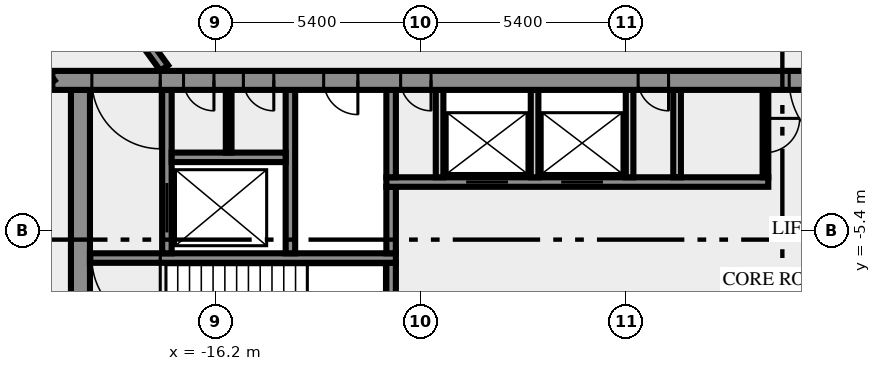
"""IFC4 building model, lengths in metres.
Left out: names, types, materials, properties, quantities, classifications, styles, units other than length and angle.
Written with IfcOpenShell. Run it as: python <this file> out.ifc"""

import sys

from ifc_helpers import new_model, si_unit, direction, frame, frame_2d, origin, place, context, subcontext, project, spatial, rectangle, extrude, element, fill, save


model = new_model("IFC4")
c1 = context("Model", 3, precision=1e-05, world=origin(), true_north=direction((0.0, 1.0)))
c2 = subcontext(c1, "Body", "Model", "MODEL_VIEW")
j1 = project(units=[si_unit("LENGTHUNIT", "METRE"), si_unit("PLANEANGLEUNIT", "RADIAN")], contexts=[c1])
p1 = place(None, origin())
s1 = spatial("IfcSite", under=j1, at=p1, CompositionType="ELEMENT")
p2 = place(p1, origin())
s2 = spatial("IfcBuilding", under=s1, at=p2, CompositionType="ELEMENT")
p3 = place(p2, frame((0.0, 0.0, 335.0)))
s3 = spatial("IfcBuildingStorey", under=s2, at=p3, CompositionType="ELEMENT", Elevation=335.0)
p4 = place(p3, frame((-19.75, -10.5, 0.0), z_axis=(0.0, 0.0, 1.0), x_axis=(0.0, 1.0, 0.0)))
e1 = element("IfcWall", 1, at=p4, inside=s3, PredefinedType="SHEAR", context=c2, shape_type="SweptSolid", body=[
    extrude(rectangle(XDim=8.8, YDim=0.5, at=frame_2d((4.4, 0.0))), origin(), (0.0, 0.0, 1.0), 3.65),
])
p5 = place(p3, frame((-11.575, -7.25, 0.0), z_axis=(0.0, 0.0, 1.0), x_axis=(0.0, 1.0, 0.0)))
e2 = element("IfcWall", 2, at=p5, inside=s3, PredefinedType="SHEAR", context=c2, shape_type="SweptSolid", body=[
    extrude(rectangle(XDim=1.0, YDim=0.25, at=frame_2d((0.5, 0.0))), origin(), (0.0, 0.0, 1.0), 3.65),
])
p6 = place(p3, frame((-11.45, -6.125, 0.0), z_axis=(0.0, 0.0, 1.0), x_axis=(-1.0, 0.0, 0.0)))
e3 = element("IfcWall", 3, at=p6, inside=s3, PredefinedType="SHEAR", context=c2, shape_type="SweptSolid", body=[
    extrude(rectangle(XDim=8.05, YDim=0.25, at=frame_2d((4.025, 0.0))), origin(), (0.0, 0.0, 1.0), 3.65),
])
p7 = place(p6, frame((6.2, 0.0, 0.0)))
e4 = element("IfcOpeningElement", 4, at=p7, cuts=e3, PredefinedType="OPENING", context=c2, shape_type="SweptSolid", body=[
    extrude(rectangle(XDim=1.8, YDim=2.1, at=frame_2d((0.9, 1.05))), frame((0.0, 0.135, 0.0), z_axis=(0.0, -1.0, 0.0), x_axis=(1.0, 0.0, 0.0)), (0.0, 0.0, 1.0), 0.27),
])
p8 = place(p3, frame((-17.475, -6.0, 0.0), z_axis=(0.0, 0.0, 1.0), x_axis=(0.0, 1.0, 0.0)))
e5 = element("IfcWall", 5, at=p8, inside=s3, PredefinedType="SHEAR", context=c2, shape_type="SweptSolid", body=[
    extrude(rectangle(XDim=4.3, YDim=0.25, at=frame_2d((2.15, 0.0))), origin(), (0.0, 0.0, 1.0), 3.65),
])
p9 = place(p8, frame((0.55, 0.0, 0.0)))
e6 = element("IfcOpeningElement", 6, at=p9, cuts=e5, PredefinedType="OPENING", context=c2, shape_type="SweptSolid", body=[
    extrude(rectangle(XDim=1.3, YDim=2.1, at=frame_2d((0.65, 1.05))), frame((0.0, 0.135, 0.0), z_axis=(0.0, -1.0, 0.0), x_axis=(1.0, 0.0, 0.0)), (0.0, 0.0, 1.0), 0.27),
])
p10 = place(p3, frame((-14.225, -6.0, 0.0), z_axis=(0.0, 0.0, 1.0), x_axis=(0.0, 1.0, 0.0)))
e7 = element("IfcWall", 7, at=p10, inside=s3, PredefinedType="SHEAR", context=c2, shape_type="SweptSolid", body=[
    extrude(rectangle(XDim=4.3, YDim=0.25, at=frame_2d((2.15, 0.0))), origin(), (0.0, 0.0, 1.0), 3.65),
])
p11 = place(p3, frame((-11.575, -6.0, 0.0), z_axis=(0.0, 0.0, 1.0), x_axis=(0.0, 1.0, 0.0)))
e8 = element("IfcWall", 8, at=p11, inside=s3, PredefinedType="SHEAR", context=c2, shape_type="SweptSolid", body=[
    extrude(rectangle(XDim=1.75, YDim=0.25, at=frame_2d((0.875, 0.0))), origin(), (0.0, 0.0, 1.0), 3.65),
])
p12 = place(p3, frame((-11.7, -4.125, 0.0), z_axis=(0.0, 0.0, 1.0), x_axis=(1.0, 0.0, 0.0)))
e9 = element("IfcWall", 9, at=p12, inside=s3, PredefinedType="SHEAR", context=c2, shape_type="SweptSolid", body=[
    extrude(rectangle(XDim=10.05, YDim=0.25, at=frame_2d((5.025, 0.0))), origin(), (0.0, 0.0, 1.0), 3.65),
])
p13 = place(p12, frame((2.1, 0.0, 0.0)))
e10 = element("IfcOpeningElement", 10, at=p13, cuts=e9, PredefinedType="OPENING", context=c2, shape_type="SweptSolid", body=[
    extrude(rectangle(XDim=1.1, YDim=2.1, at=frame_2d((0.55, 1.05))), frame((0.0, 0.135, 0.0), z_axis=(0.0, -1.0, 0.0), x_axis=(1.0, 0.0, 0.0)), (0.0, 0.0, 1.0), 0.27),
])
p14 = place(p12, frame((4.6, 0.0, 0.0)))
e11 = element("IfcOpeningElement", 11, at=p14, cuts=e9, PredefinedType="OPENING", context=c2, shape_type="SweptSolid", body=[
    extrude(rectangle(XDim=1.1, YDim=2.1, at=frame_2d((0.55, 1.05))), frame((0.0, 0.135, 0.0), z_axis=(0.0, -1.0, 0.0), x_axis=(1.0, 0.0, 0.0)), (0.0, 0.0, 1.0), 0.27),
])
p15 = place(p3, frame((-11.575, -4.0, 0.0), z_axis=(0.0, 0.0, 1.0), x_axis=(0.0, 1.0, 0.0)))
e12 = element("IfcWall", 12, at=p15, inside=s3, PredefinedType="SHEAR", context=c2, shape_type="SweptSolid", body=[
    extrude(rectangle(XDim=2.3, YDim=0.25, at=frame_2d((1.15, 0.0))), origin(), (0.0, 0.0, 1.0), 3.65),
])
for number, where, z_axis, x_axis in (
    (13, (-10.3, -4.0, 0.0), (0.0, 0.0, 1.0), (0.0, 1.0, 0.0)),
    (14, (-7.8, -4.0, 0.0), (0.0, 0.0, 1.0), (0.0, 1.0, 0.0)),
    (15, (-5.3, -4.0, 0.0), (0.0, 0.0, 1.0), (0.0, 1.0, 0.0)),
    (16, (-4.05, -4.0, 0.0), (0.0, 0.0, 1.0), (0.0, 1.0, 0.0)),
):
    element("IfcWall", number, at=place(p3, frame(where, z_axis=z_axis, x_axis=x_axis)), inside=s3, PredefinedType="SOLIDWALL", context=c2, shape_type="SweptSolid", body=[
        extrude(rectangle(XDim=2.3, YDim=0.2, at=frame_2d((1.15, 0.0))), origin(), (0.0, 0.0, 1.0), 3.65),
    ])
p16 = place(p3, frame((-1.725, -1.7, 0.0), z_axis=(0.0, 0.0, 1.0), x_axis=(0.0, -1.0, 0.0)))
e17 = element("IfcWall", 17, at=p16, inside=s3, PredefinedType="PARTITIONING", context=c2, shape_type="SweptSolid", body=[
    extrude(rectangle(XDim=2.3, YDim=0.15, at=frame_2d((1.15, 0.0))), origin(), (0.0, 0.0, 1.0), 3.65),
])
p17 = place(p16, frame((0.75, 0.0, 0.0)))
e18 = element("IfcOpeningElement", 18, at=p17, cuts=e17, PredefinedType="OPENING", context=c2, shape_type="SweptSolid", body=[
    extrude(rectangle(XDim=0.9, YDim=2.1, at=frame_2d((0.45, 1.05))), frame((0.0, 0.085, 0.0), z_axis=(0.0, -1.0, 0.0), x_axis=(1.0, 0.0, 0.0)), (0.0, 0.0, 1.0), 0.17),
])
p18 = place(p3, frame((-17.35, -3.475, 0.0), z_axis=(0.0, 0.0, 1.0), x_axis=(1.0, 0.0, 0.0)))
e19 = element("IfcWall", 19, at=p18, inside=s3, PredefinedType="SHEAR", context=c2, shape_type="SweptSolid", body=[
    extrude(rectangle(XDim=3.0, YDim=0.25, at=frame_2d((1.5, 0.0))), origin(), (0.0, 0.0, 1.0), 3.65),
])
p19 = place(p3, frame((-15.85, -3.35, 0.0), z_axis=(0.0, 0.0, 1.0), x_axis=(0.0, 1.0, 0.0)))
e20 = element("IfcWall", 20, at=p19, inside=s3, PredefinedType="PARTITIONING", context=c2, shape_type="SweptSolid", body=[
    extrude(rectangle(XDim=1.65, YDim=0.15, at=frame_2d((0.825, 0.0))), origin(), (0.0, 0.0, 1.0), 3.65),
])
p20 = place(p3, frame((20.49, -1.45, 0.0), z_axis=(0.0, 0.0, 1.0), x_axis=(-1.0, 0.0, 0.0)))
e21 = element("IfcWall", 21, at=p20, inside=s3, PredefinedType="SHEAR", context=c2, shape_type="SweptSolid", body=[
    extrude(rectangle(XDim=40.98, YDim=0.5, at=frame_2d((20.49, 0.0))), origin(), (0.0, 0.0, 1.0), 3.65),
])
p21 = place(p20, frame((38.14, 0.0, 0.0)))
e22 = element("IfcOpeningElement", 22, at=p21, cuts=e21, PredefinedType="OPENING", context=c2, shape_type="SweptSolid", body=[
    extrude(rectangle(XDim=1.8, YDim=2.1, at=frame_2d((0.9, 1.05))), frame((0.0, 0.26, 0.0), z_axis=(0.0, -1.0, 0.0), x_axis=(1.0, 0.0, 0.0)), (0.0, 0.0, 1.0), 0.52),
])
p22 = place(p20, frame((36.728, 0.0, 0.0)))
e23 = element("IfcOpeningElement", 23, at=p22, cuts=e21, PredefinedType="OPENING", context=c2, shape_type="SweptSolid", body=[
    extrude(rectangle(XDim=0.8, YDim=2.1, at=frame_2d((0.4, 1.05))), frame((0.0, 0.26, 0.0), z_axis=(0.0, -1.0, 0.0), x_axis=(1.0, 0.0, 0.0)), (0.0, 0.0, 1.0), 0.52),
])
p23 = place(p20, frame((35.153, 0.0, 0.0)))
e24 = element("IfcOpeningElement", 24, at=p23, cuts=e21, PredefinedType="OPENING", context=c2, shape_type="SweptSolid", body=[
    extrude(rectangle(XDim=0.8, YDim=2.1, at=frame_2d((0.4, 1.05))), frame((0.0, 0.26, 0.0), z_axis=(0.0, -1.0, 0.0), x_axis=(1.0, 0.0, 0.0)), (0.0, 0.0, 1.0), 0.52),
])
p24 = place(p20, frame((32.94, 0.0, 0.0)))
e25 = element("IfcOpeningElement", 25, at=p24, cuts=e21, PredefinedType="OPENING", context=c2, shape_type="SweptSolid", body=[
    extrude(rectangle(XDim=0.9, YDim=2.1, at=frame_2d((0.45, 1.05))), frame((0.0, 0.26, 0.0), z_axis=(0.0, -1.0, 0.0), x_axis=(1.0, 0.0, 0.0)), (0.0, 0.0, 1.0), 0.52),
])
p25 = place(p20, frame((31.015, 0.0, 0.0)))
e26 = element("IfcOpeningElement", 26, at=p25, cuts=e21, PredefinedType="OPENING", context=c2, shape_type="SweptSolid", body=[
    extrude(rectangle(XDim=0.8, YDim=2.1, at=frame_2d((0.4, 1.05))), frame((0.0, 0.26, 0.0), z_axis=(0.0, -1.0, 0.0), x_axis=(1.0, 0.0, 0.0)), (0.0, 0.0, 1.0), 0.52),
])
p26 = place(p20, frame((24.765, 0.0, 0.0)))
e27 = element("IfcOpeningElement", 27, at=p26, cuts=e21, PredefinedType="OPENING", context=c2, shape_type="SweptSolid", body=[
    extrude(rectangle(XDim=0.8, YDim=2.1, at=frame_2d((0.4, 1.05))), frame((0.0, 0.26, 0.0), z_axis=(0.0, -1.0, 0.0), x_axis=(1.0, 0.0, 0.0)), (0.0, 0.0, 1.0), 0.52),
])
p27 = place(p20, frame((19.59, 0.0, 0.0)))
e28 = element("IfcOpeningElement", 28, at=p27, cuts=e21, PredefinedType="OPENING", context=c2, shape_type="SweptSolid", body=[
    extrude(rectangle(XDim=2.0, YDim=2.1, at=frame_2d((1.0, 1.05))), frame((0.0, 0.26, 0.0), z_axis=(0.0, -1.0, 0.0), x_axis=(1.0, 0.0, 0.0)), (0.0, 0.0, 1.0), 0.52),
])
p28 = place(p20, frame((15.103, 0.0, 0.0)))
e29 = element("IfcOpeningElement", 29, at=p28, cuts=e21, PredefinedType="OPENING", context=c2, shape_type="SweptSolid", body=[
    extrude(rectangle(XDim=0.9, YDim=2.1, at=frame_2d((0.45, 1.05))), frame((0.0, 0.26, 0.0), z_axis=(0.0, -1.0, 0.0), x_axis=(1.0, 0.0, 0.0)), (0.0, 0.0, 1.0), 0.52),
])
p29 = place(p20, frame((13.04, 0.0, 0.0)))
e30 = element("IfcOpeningElement", 30, at=p29, cuts=e21, PredefinedType="OPENING", context=c2, shape_type="SweptSolid", body=[
    extrude(rectangle(XDim=0.9, YDim=2.1, at=frame_2d((0.45, 1.05))), frame((0.0, 0.26, 0.0), z_axis=(0.0, -1.0, 0.0), x_axis=(1.0, 0.0, 0.0)), (0.0, 0.0, 1.0), 0.52),
])
p30 = place(p20, frame((10.177, 0.0, 0.0)))
e31 = element("IfcOpeningElement", 31, at=p30, cuts=e21, PredefinedType="OPENING", context=c2, shape_type="SweptSolid", body=[
    extrude(rectangle(XDim=0.9, YDim=2.1, at=frame_2d((0.45, 1.05))), frame((0.0, 0.26, 0.0), z_axis=(0.0, -1.0, 0.0), x_axis=(1.0, 0.0, 0.0)), (0.0, 0.0, 1.0), 0.52),
])
p31 = place(p20, frame((7.14, 0.0, 0.0)))
e32 = element("IfcOpeningElement", 32, at=p31, cuts=e21, PredefinedType="OPENING", context=c2, shape_type="SweptSolid", body=[
    extrude(rectangle(XDim=0.9, YDim=2.1, at=frame_2d((0.45, 1.05))), frame((0.0, 0.26, 0.0), z_axis=(0.0, -1.0, 0.0), x_axis=(1.0, 0.0, 0.0)), (0.0, 0.0, 1.0), 0.52),
])
p32 = place(p20, frame((4.19, 0.0, 0.0)))
e33 = element("IfcOpeningElement", 33, at=p32, cuts=e21, PredefinedType="OPENING", context=c2, shape_type="SweptSolid", body=[
    extrude(rectangle(XDim=0.9, YDim=2.1, at=frame_2d((0.45, 1.05))), frame((0.0, 0.26, 0.0), z_axis=(0.0, -1.0, 0.0), x_axis=(1.0, 0.0, 0.0)), (0.0, 0.0, 1.0), 0.52),
])
p33 = place(p20, frame((1.04, 0.0, 0.0)))
e34 = element("IfcOpeningElement", 34, at=p33, cuts=e21, PredefinedType="OPENING", context=c2, shape_type="SweptSolid", body=[
    extrude(rectangle(XDim=1.8, YDim=2.1, at=frame_2d((0.9, 1.05))), frame((0.0, 0.26, 0.0), z_axis=(0.0, -1.0, 0.0), x_axis=(1.0, 0.0, 0.0)), (0.0, 0.0, 1.0), 0.52),
])
p34 = place(p3, frame((-20.531, -1.523, 0.0), z_axis=(0.0, 0.0, 1.0), x_axis=(-0.587785867777, 0.809016547199, 0.0)))
e35 = element("IfcWall", 35, at=p34, inside=s3, PredefinedType="SOLIDWALL", context=c2, shape_type="SweptSolid", body=[
    extrude(rectangle(XDim=16.67, YDim=0.25, at=frame_2d((8.335, 0.0))), origin(), (0.0, 0.0, 1.0), 3.65),
])
p35 = place(p34, frame((0.533, 0.0, 0.0)))
e36 = element("IfcOpeningElement", 36, at=p35, cuts=e35, PredefinedType="OPENING", context=c2, shape_type="SweptSolid", body=[
    extrude(rectangle(XDim=0.9, YDim=2.1, at=frame_2d((0.45, 1.05))), frame((0.0, 0.135, 0.0), z_axis=(0.0, -1.0, 0.0), x_axis=(1.0, 0.0, 0.0)), (0.0, 0.0, 1.0), 0.27),
])
p36 = place(p34, frame((15.296, 0.0, 0.0)))
e37 = element("IfcOpeningElement", 37, at=p36, cuts=e35, PredefinedType="OPENING", context=c2, shape_type="SweptSolid", body=[
    extrude(rectangle(XDim=0.9, YDim=2.1, at=frame_2d((0.45, 1.05))), frame((0.0, 0.135, 0.0), z_axis=(0.0, -1.0, 0.0), x_axis=(1.0, 0.0, 0.0)), (0.0, 0.0, 1.0), 0.27),
])
p37 = place(p3, frame((-28.039, 13.319, 0.0), z_axis=(0.0, 0.0, 1.0), x_axis=(0.587791911753, -0.809012155952, 0.0)))
e38 = element("IfcWall", 38, at=p37, inside=s3, PredefinedType="SOLIDWALL", context=c2, shape_type="SweptSolid", body=[
    extrude(rectangle(XDim=17.853, YDim=0.25, at=frame_2d((8.927, 0.0))), origin(), (0.0, 0.0, 1.0), 3.65),
])
p38 = place(p37, frame((0.225, 0.0, 0.0)))
e39 = element("IfcOpeningElement", 39, at=p38, cuts=e38, PredefinedType="OPENING", context=c2, shape_type="SweptSolid", body=[
    extrude(rectangle(XDim=0.9, YDim=2.1, at=frame_2d((0.45, 1.05))), frame((0.0, 0.135, 0.0), z_axis=(0.0, -1.0, 0.0), x_axis=(1.0, 0.0, 0.0)), (0.0, 0.0, 1.0), 0.27),
])
p39 = place(p7, origin())
e40 = element("IfcDoor", 40, at=p39, inside=s3, OperationType="DOUBLE_DOOR_SINGLE_SWING", PredefinedType="DOOR", context=c2, shape_type="SweptSolid", body=[
    extrude(rectangle(XDim=1.8, YDim=2.1, at=frame_2d((0.9, 1.05))), frame((0.0, 0.025, 0.0), z_axis=(0.0, -1.0, 0.0), x_axis=(1.0, 0.0, 0.0)), (0.0, 0.0, 1.0), 0.05),
])
fill(e4, e40)
p40 = place(p9, origin())
e41 = element("IfcDoor", 41, at=p40, inside=s3, OperationType="DOUBLE_DOOR_SLIDING", PredefinedType="DOOR", context=c2, shape_type="SweptSolid", body=[
    extrude(rectangle(XDim=1.3, YDim=2.1, at=frame_2d((0.65, 1.05))), frame((0.0, 0.025, 0.0), z_axis=(0.0, -1.0, 0.0), x_axis=(1.0, 0.0, 0.0)), (0.0, 0.0, 1.0), 0.05),
])
fill(e6, e41)
p41 = place(p13, origin())
e42 = element("IfcDoor", 42, at=p41, inside=s3, OperationType="DOUBLE_DOOR_SLIDING", PredefinedType="DOOR", context=c2, shape_type="SweptSolid", body=[
    extrude(rectangle(XDim=1.1, YDim=2.1, at=frame_2d((0.55, 1.05))), frame((0.0, 0.025, 0.0), z_axis=(0.0, -1.0, 0.0), x_axis=(1.0, 0.0, 0.0)), (0.0, 0.0, 1.0), 0.05),
])
fill(e10, e42)
p42 = place(p14, origin())
e43 = element("IfcDoor", 43, at=p42, inside=s3, OperationType="DOUBLE_DOOR_SLIDING", PredefinedType="DOOR", context=c2, shape_type="SweptSolid", body=[
    extrude(rectangle(XDim=1.1, YDim=2.1, at=frame_2d((0.55, 1.05))), frame((0.0, 0.025, 0.0), z_axis=(0.0, -1.0, 0.0), x_axis=(1.0, 0.0, 0.0)), (0.0, 0.0, 1.0), 0.05),
])
fill(e11, e43)
p43 = place(p17, origin())
e44 = element("IfcDoor", 44, at=p43, inside=s3, OperationType="SINGLE_SWING_RIGHT", PredefinedType="DOOR", context=c2, shape_type="SweptSolid", body=[
    extrude(rectangle(XDim=0.9, YDim=2.1, at=frame_2d((0.45, 1.05))), frame((0.0, 0.025, 0.0), z_axis=(0.0, -1.0, 0.0), x_axis=(1.0, 0.0, 0.0)), (0.0, 0.0, 1.0), 0.05),
])
fill(e18, e44)
p44 = place(p21, origin())
e45 = element("IfcDoor", 45, at=p44, inside=s3, OperationType="DOUBLE_DOOR_SINGLE_SWING", PredefinedType="DOOR", context=c2, shape_type="SweptSolid", body=[
    extrude(rectangle(XDim=1.8, YDim=2.1, at=frame_2d((0.9, 1.05))), frame((0.0, 0.025, 0.0), z_axis=(0.0, -1.0, 0.0), x_axis=(1.0, 0.0, 0.0)), (0.0, 0.0, 1.0), 0.05),
])
fill(e22, e45)
p45 = place(p22, origin())
e46 = element("IfcDoor", 46, at=p45, inside=s3, OperationType="SINGLE_SWING_RIGHT", PredefinedType="DOOR", context=c2, shape_type="SweptSolid", body=[
    extrude(rectangle(XDim=0.8, YDim=2.1, at=frame_2d((0.4, 1.05))), frame((0.0, 0.025, 0.0), z_axis=(0.0, -1.0, 0.0), x_axis=(1.0, 0.0, 0.0)), (0.0, 0.0, 1.0), 0.05),
])
fill(e23, e46)
p46 = place(p23, origin())
e47 = element("IfcDoor", 47, at=p46, inside=s3, OperationType="SINGLE_SWING_RIGHT", PredefinedType="DOOR", context=c2, shape_type="SweptSolid", body=[
    extrude(rectangle(XDim=0.8, YDim=2.1, at=frame_2d((0.4, 1.05))), frame((0.0, 0.025, 0.0), z_axis=(0.0, -1.0, 0.0), x_axis=(1.0, 0.0, 0.0)), (0.0, 0.0, 1.0), 0.05),
])
fill(e24, e47)
p47 = place(p24, origin())
e48 = element("IfcDoor", 48, at=p47, inside=s3, OperationType="SINGLE_SWING_RIGHT", PredefinedType="DOOR", context=c2, shape_type="SweptSolid", body=[
    extrude(rectangle(XDim=0.9, YDim=2.1, at=frame_2d((0.45, 1.05))), frame((0.0, 0.025, 0.0), z_axis=(0.0, -1.0, 0.0), x_axis=(1.0, 0.0, 0.0)), (0.0, 0.0, 1.0), 0.05),
])
fill(e25, e48)
p48 = place(p25, origin())
e49 = element("IfcDoor", 49, at=p48, inside=s3, OperationType="SINGLE_SWING_RIGHT", PredefinedType="DOOR", context=c2, shape_type="SweptSolid", body=[
    extrude(rectangle(XDim=0.8, YDim=2.1, at=frame_2d((0.4, 1.05))), frame((0.0, 0.025, 0.0), z_axis=(0.0, -1.0, 0.0), x_axis=(1.0, 0.0, 0.0)), (0.0, 0.0, 1.0), 0.05),
])
fill(e26, e49)
p49 = place(p26, origin())
e50 = element("IfcDoor", 50, at=p49, inside=s3, OperationType="SINGLE_SWING_RIGHT", PredefinedType="DOOR", context=c2, shape_type="SweptSolid", body=[
    extrude(rectangle(XDim=0.8, YDim=2.1, at=frame_2d((0.4, 1.05))), frame((0.0, 0.025, 0.0), z_axis=(0.0, -1.0, 0.0), x_axis=(1.0, 0.0, 0.0)), (0.0, 0.0, 1.0), 0.05),
])
fill(e27, e50)
p50 = place(p27, origin())
e51 = element("IfcDoor", 51, at=p50, inside=s3, OperationType="DOUBLE_DOOR_SINGLE_SWING", PredefinedType="DOOR", context=c2, shape_type="SweptSolid", body=[
    extrude(rectangle(XDim=2.0, YDim=2.1, at=frame_2d((1.0, 1.05))), frame((0.0, 0.025, 0.0), z_axis=(0.0, -1.0, 0.0), x_axis=(1.0, 0.0, 0.0)), (0.0, 0.0, 1.0), 0.05),
])
fill(e28, e51)
save(model, sys.argv[1])
